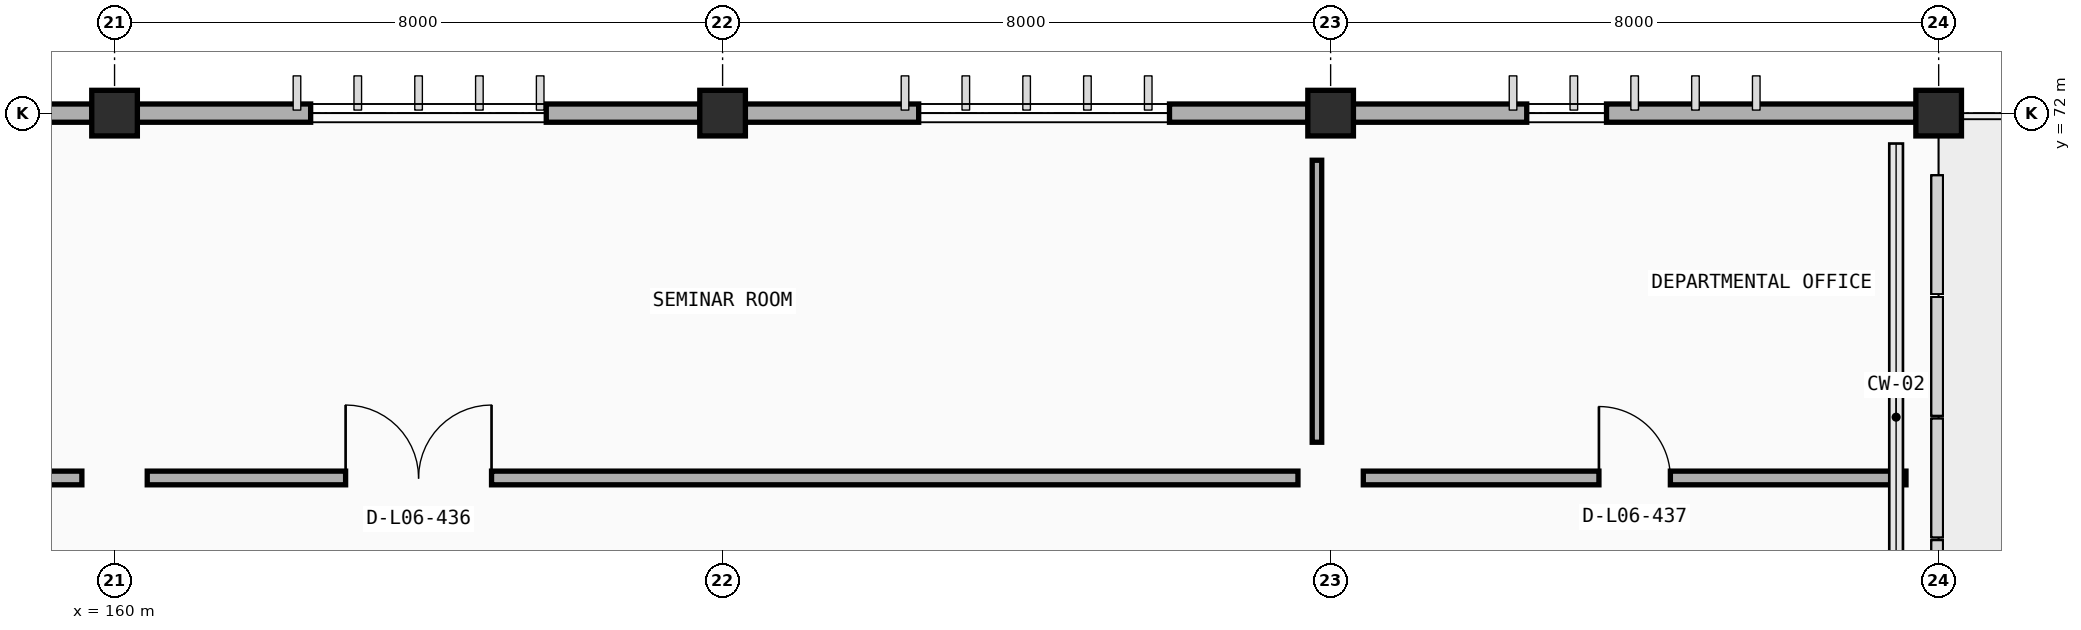
"""IFC4 building model, lengths in metres.
Left out: names, types, materials, properties, quantities, classifications, styles, units other than length and angle.
Written with IfcOpenShell. Run it as: python <this file> out.ifc"""

import sys

from ifc_helpers import new_model, si_unit, direction, frame, frame_2d, origin, origin_2d, place, context, subcontext, project, spatial, rectangle, extrude, element, fill, save


model = new_model("IFC4")
c1 = context("Model", 3, precision=1e-05, world=origin(), true_north=direction((0.0, 1.0)))
c2 = subcontext(c1, "Body", "Model", "MODEL_VIEW")
j1 = project(units=[si_unit("LENGTHUNIT", "METRE"), si_unit("PLANEANGLEUNIT", "RADIAN")], contexts=[c1])
p1 = place(None, origin())
s1 = spatial("IfcSite", under=j1, at=p1, CompositionType="ELEMENT")
p2 = place(p1, origin())
s2 = spatial("IfcBuilding", under=s1, at=p2, CompositionType="ELEMENT")
p3 = place(p2, frame((0.0, 0.0, 22.2)))
s3 = spatial("IfcBuildingStorey", under=s2, at=p3, CompositionType="ELEMENT", Elevation=22.2)
for number, where, z_axis, x_axis in (
    (1, (160.0, 72.0, 0.0), (0.0, 0.0, 1.0), (1.0, 0.0, 0.0)),
    (2, (168.0, 72.0, 0.0), (0.0, 0.0, 1.0), (1.0, 0.0, 0.0)),
    (3, (176.0, 72.0, 0.0), (0.0, 0.0, 1.0), (1.0, 0.0, 0.0)),
    (4, (184.0, 72.0, 0.0), (0.0, 0.0, 1.0), (1.0, 0.0, 0.0)),
):
    element("IfcColumn", number, at=place(p3, frame(where, z_axis=z_axis, x_axis=x_axis)), inside=s3, PredefinedType="COLUMN", context=c2, shape_type="SweptSolid", body=[
        extrude(rectangle(XDim=0.6, YDim=0.6, at=origin_2d()), origin(), (0.0, 0.0, 1.0), 4.2),
    ])
p4 = place(p3, frame((152.297, 72.0, 0.0), z_axis=(0.0, 0.0, 1.0), x_axis=(1.0, 0.0, 0.0)))
e5 = element("IfcWall", 5, at=p4, inside=s3, PredefinedType="STANDARD", context=c2, shape_type="SweptSolid", body=[
    extrude(rectangle(XDim=7.406, YDim=0.24, at=frame_2d((3.703, 0.0))), origin(), (0.0, 0.0, 1.0), 3.335),
])
p5 = place(p4, frame((2.283, 0.0, 0.9)))
e6 = element("IfcOpeningElement", 6, at=p5, cuts=e5, PredefinedType="OPENING", context=c2, shape_type="SweptSolid", body=[
    extrude(rectangle(XDim=1.25, YDim=1.25, at=frame_2d((0.625, 0.625))), frame((0.0, 0.13, 0.0), z_axis=(0.0, -1.0, 0.0), x_axis=(1.0, 0.0, 0.0)), (0.0, 0.0, 1.0), 0.26),
])
p6 = place(p3, frame((160.297, 72.0, 0.0), z_axis=(0.0, 0.0, 1.0), x_axis=(1.0, 0.0, 0.0)))
e7 = element("IfcWall", 7, at=p6, inside=s3, PredefinedType="STANDARD", context=c2, shape_type="SweptSolid", body=[
    extrude(rectangle(XDim=7.406, YDim=0.24, at=frame_2d((3.703, 0.0))), origin(), (0.0, 0.0, 1.0), 3.335),
])
p7 = place(p6, frame((2.283, 0.0, 0.9)))
e8 = element("IfcOpeningElement", 8, at=p7, cuts=e7, PredefinedType="OPENING", context=c2, shape_type="SweptSolid", body=[
    extrude(rectangle(XDim=3.1, YDim=1.6, at=frame_2d((1.55, 0.8))), frame((0.0, 0.13, 0.0), z_axis=(0.0, -1.0, 0.0), x_axis=(1.0, 0.0, 0.0)), (0.0, 0.0, 1.0), 0.26),
])
p8 = place(p3, frame((168.297, 72.0, 0.0), z_axis=(0.0, 0.0, 1.0), x_axis=(1.0, 0.0, 0.0)))
e9 = element("IfcWall", 9, at=p8, inside=s3, PredefinedType="STANDARD", context=c2, shape_type="SweptSolid", body=[
    extrude(rectangle(XDim=7.406, YDim=0.24, at=frame_2d((3.703, 0.0))), origin(), (0.0, 0.0, 1.0), 3.335),
])
p9 = place(p8, frame((2.283, 0.0, 0.9)))
e10 = element("IfcOpeningElement", 10, at=p9, cuts=e9, PredefinedType="OPENING", context=c2, shape_type="SweptSolid", body=[
    extrude(rectangle(XDim=3.3, YDim=1.75, at=frame_2d((1.65, 0.875))), frame((0.0, 0.13, 0.0), z_axis=(0.0, -1.0, 0.0), x_axis=(1.0, 0.0, 0.0)), (0.0, 0.0, 1.0), 0.26),
])
p10 = place(p3, frame((176.297, 72.0, 0.0), z_axis=(0.0, 0.0, 1.0), x_axis=(1.0, 0.0, 0.0)))
e11 = element("IfcWall", 11, at=p10, inside=s3, PredefinedType="STANDARD", context=c2, shape_type="SweptSolid", body=[
    extrude(rectangle(XDim=7.406, YDim=0.24, at=frame_2d((3.703, 0.0))), origin(), (0.0, 0.0, 1.0), 3.335),
])
p11 = place(p10, frame((2.283, 0.0, 0.9)))
e12 = element("IfcOpeningElement", 12, at=p11, cuts=e11, PredefinedType="OPENING", context=c2, shape_type="SweptSolid", body=[
    extrude(rectangle(XDim=1.05, YDim=1.25, at=frame_2d((0.525, 0.625))), frame((0.0, 0.13, 0.0), z_axis=(0.0, -1.0, 0.0), x_axis=(1.0, 0.0, 0.0)), (0.0, 0.0, 1.0), 0.26),
])
p12 = place(p3, frame((183.76, 71.78, 0.0), z_axis=(0.0, 0.0, 1.0), x_axis=(-1.0, 0.0, 0.0)))
e13 = element("IfcWall", 13, at=p12, inside=s3, PredefinedType="PARAPET", context=c2, shape_type="SweptSolid", body=[
    extrude(rectangle(XDim=0.32, YDim=0.2, at=frame_2d((0.16, 0.0))), origin(), (0.0, 0.0, 1.0), 3.35),
])
p13 = place(p3, frame((128.43, 67.2, 0.0), z_axis=(0.0, 0.0, 1.0), x_axis=(1.0, 0.0, 0.0)))
e14 = element("IfcWall", 14, at=p13, inside=s3, PredefinedType="PARTITIONING", context=c2, shape_type="SweptSolid", body=[
    extrude(rectangle(XDim=31.14, YDim=0.18, at=frame_2d((15.57, 0.0))), origin(), (0.0, 0.0, 1.0), 3.3),
])
p14 = place(p13, frame((2.96, 0.0, 0.0)))
e15 = element("IfcOpeningElement", 15, at=p14, cuts=e14, PredefinedType="OPENING", context=c2, shape_type="SweptSolid", body=[
    extrude(rectangle(XDim=1.22, YDim=2.18, at=frame_2d((0.61, 1.09))), frame((0.0, 0.1, 0.0), z_axis=(0.0, -1.0, 0.0), x_axis=(1.0, 0.0, 0.0)), (0.0, 0.0, 1.0), 0.2),
])
p15 = place(p3, frame((160.43, 67.2, 0.0), z_axis=(0.0, 0.0, 1.0), x_axis=(1.0, 0.0, 0.0)))
e16 = element("IfcWall", 16, at=p15, inside=s3, PredefinedType="PARTITIONING", context=c2, shape_type="SweptSolid", body=[
    extrude(rectangle(XDim=15.14, YDim=0.18, at=frame_2d((7.57, 0.0))), origin(), (0.0, 0.0, 1.0), 3.3),
])
p16 = place(p15, frame((2.61, 0.0, 0.0)))
e17 = element("IfcOpeningElement", 17, at=p16, cuts=e16, PredefinedType="OPENING", context=c2, shape_type="SweptSolid", body=[
    extrude(rectangle(XDim=1.92, YDim=2.3, at=frame_2d((0.96, 1.15))), frame((0.0, 0.1, 0.0), z_axis=(0.0, -1.0, 0.0), x_axis=(1.0, 0.0, 0.0)), (0.0, 0.0, 1.0), 0.2),
])
p17 = place(p3, frame((175.82, 67.67, 0.0), z_axis=(0.0, 0.0, 1.0), x_axis=(0.0, 1.0, 0.0)))
e18 = element("IfcWall", 18, at=p17, inside=s3, PredefinedType="PARTITIONING", context=c2, shape_type="SweptSolid", body=[
    extrude(rectangle(XDim=3.71, YDim=0.125, at=frame_2d((1.855, 0.0))), origin(), (0.0, 0.0, 1.0), 3.3),
])
p18 = place(p3, frame((176.43, 67.2, 0.0), z_axis=(0.0, 0.0, 1.0), x_axis=(1.0, 0.0, 0.0)))
e19 = element("IfcWall", 19, at=p18, inside=s3, PredefinedType="PARTITIONING", context=c2, shape_type="SweptSolid", body=[
    extrude(rectangle(XDim=7.14, YDim=0.18, at=frame_2d((3.57, 0.0))), origin(), (0.0, 0.0, 1.0), 3.3),
])
p19 = place(p18, frame((3.1, 0.0, 0.0)))
e20 = element("IfcOpeningElement", 20, at=p19, cuts=e19, PredefinedType="OPENING", context=c2, shape_type="SweptSolid", body=[
    extrude(rectangle(XDim=0.94, YDim=2.1, at=frame_2d((0.47, 1.05))), frame((0.0, 0.1, 0.0), z_axis=(0.0, -1.0, 0.0), x_axis=(1.0, 0.0, 0.0)), (0.0, 0.0, 1.0), 0.2),
])
p20 = place(p7, origin())
e21 = element("IfcWindow", 21, at=p20, inside=s3, PartitioningType="DOUBLE_PANEL_VERTICAL", PredefinedType="WINDOW", context=c2, shape_type="SweptSolid", body=[
    extrude(rectangle(XDim=3.1, YDim=1.6, at=frame_2d((1.55, 0.8))), frame((0.0, 0.03, 0.0), z_axis=(0.0, -1.0, 0.0), x_axis=(1.0, 0.0, 0.0)), (0.0, 0.0, 1.0), 0.06),
])
fill(e8, e21)
p21 = place(p9, origin())
e22 = element("IfcWindow", 22, at=p21, inside=s3, PartitioningType="DOUBLE_PANEL_VERTICAL", PredefinedType="WINDOW", context=c2, shape_type="SweptSolid", body=[
    extrude(rectangle(XDim=3.3, YDim=1.75, at=frame_2d((1.65, 0.875))), frame((0.0, 0.03, 0.0), z_axis=(0.0, -1.0, 0.0), x_axis=(1.0, 0.0, 0.0)), (0.0, 0.0, 1.0), 0.06),
])
fill(e10, e22)
p22 = place(p11, origin())
e23 = element("IfcWindow", 23, at=p22, inside=s3, PartitioningType="SINGLE_PANEL", PredefinedType="WINDOW", context=c2, shape_type="SweptSolid", body=[
    extrude(rectangle(XDim=1.05, YDim=1.25, at=frame_2d((0.525, 0.625))), frame((0.0, 0.03, 0.0), z_axis=(0.0, -1.0, 0.0), x_axis=(1.0, 0.0, 0.0)), (0.0, 0.0, 1.0), 0.06),
])
fill(e12, e23)
p23 = place(p16, origin())
e24 = element("IfcDoor", 24, at=p23, inside=s3, OperationType="DOUBLE_DOOR_SINGLE_SWING", PredefinedType="DOOR", context=c2, shape_type="SweptSolid", body=[
    extrude(rectangle(XDim=1.92, YDim=2.3, at=frame_2d((0.96, 1.15))), frame((0.0, 0.025, 0.0), z_axis=(0.0, -1.0, 0.0), x_axis=(1.0, 0.0, 0.0)), (0.0, 0.0, 1.0), 0.05),
])
fill(e17, e24)
p24 = place(p19, origin())
e25 = element("IfcDoor", 25, at=p24, inside=s3, OperationType="SINGLE_SWING_LEFT", PredefinedType="DOOR", context=c2, shape_type="SweptSolid", body=[
    extrude(rectangle(XDim=0.94, YDim=2.1, at=frame_2d((0.47, 1.05))), frame((0.0, 0.025, 0.0), z_axis=(0.0, -1.0, 0.0), x_axis=(1.0, 0.0, 0.0)), (0.0, 0.0, 1.0), 0.05),
])
fill(e20, e25)
save(model, sys.argv[1])
